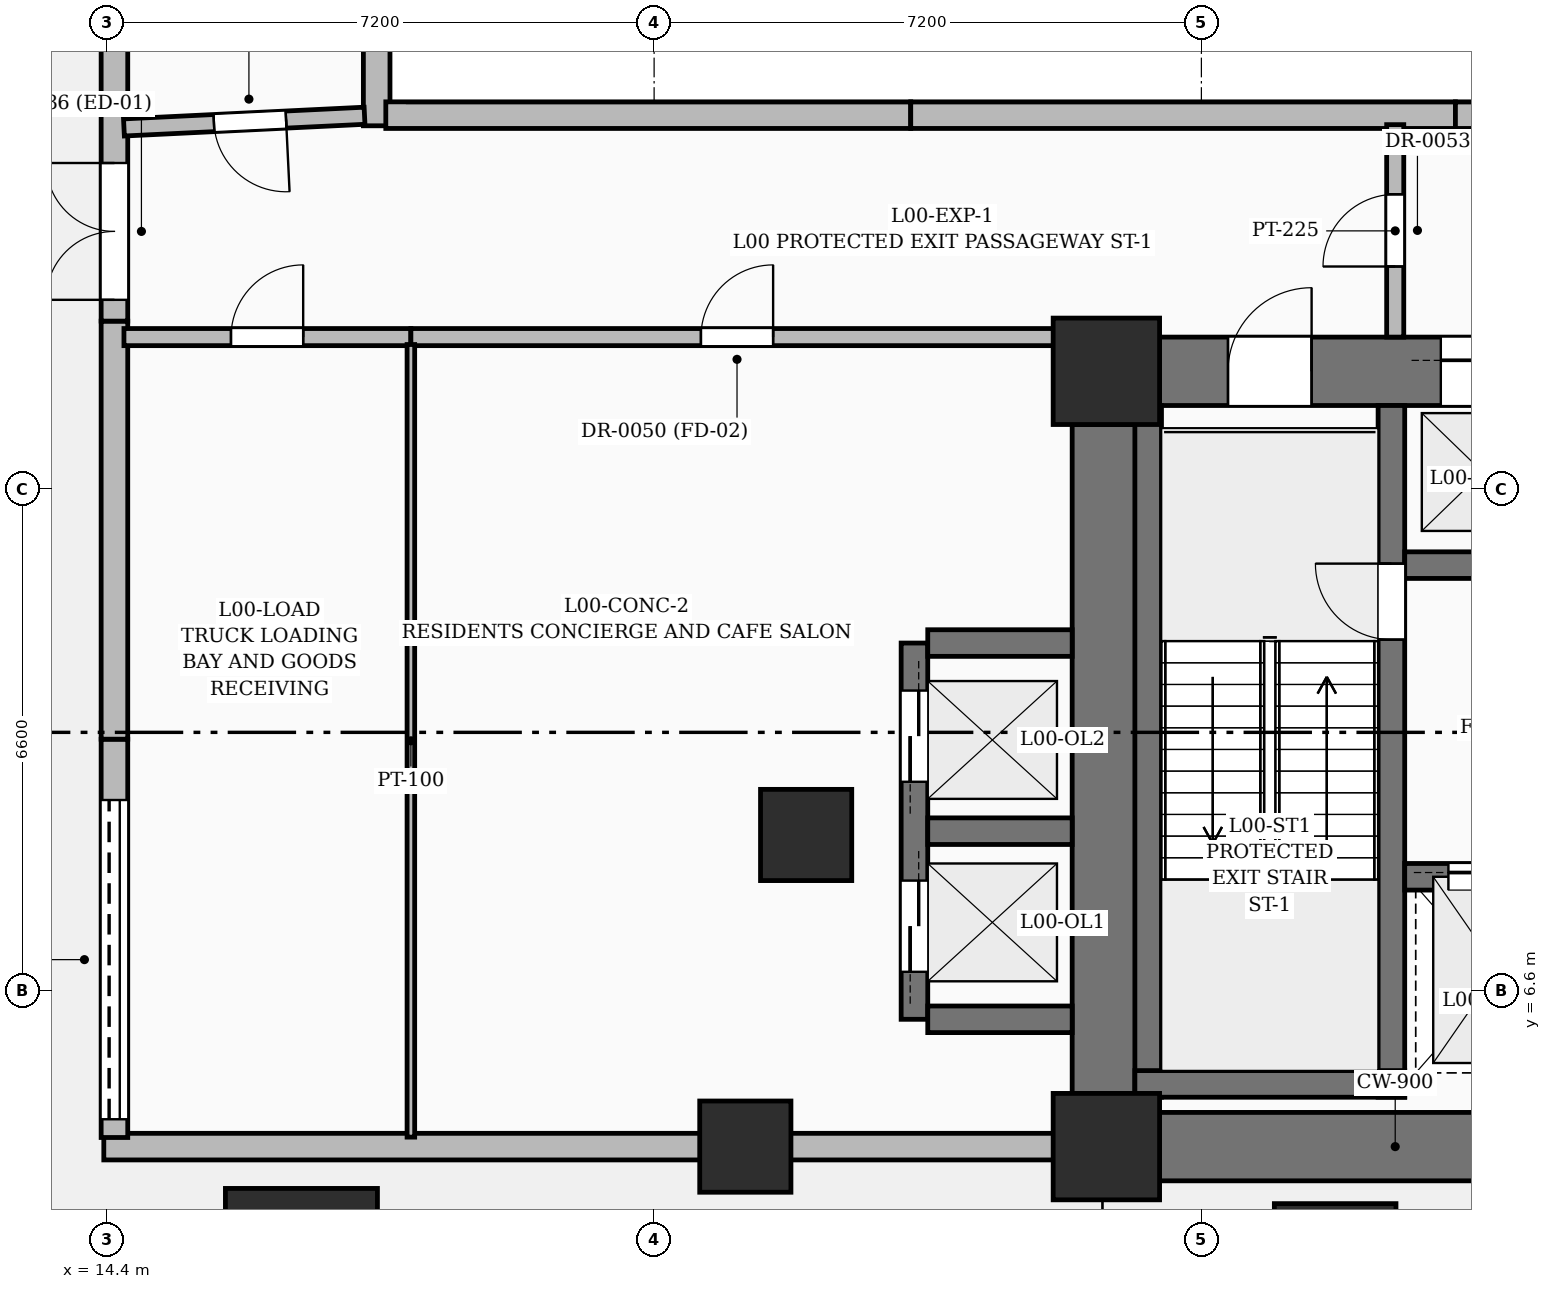
"""IFC4 building model, lengths in metres.
Left out: names, types, materials, properties, quantities, classifications, styles, units other than length and angle.
Written with IfcOpenShell. Run it as: python <this file> out.ifc"""

import sys

from ifc_helpers import new_model, si_unit, direction, frame, frame_2d, origin, origin_2d, place, context, subcontext, project, spatial, rectangle, circle, extrude, element, fill, save


model = new_model("IFC4")
c1 = context("Model", 3, precision=1e-05, world=origin(), true_north=direction((0.0, 1.0)))
c2 = subcontext(c1, "Body", "Model", "MODEL_VIEW")
j1 = project(units=[si_unit("LENGTHUNIT", "METRE"), si_unit("PLANEANGLEUNIT", "RADIAN")], contexts=[c1])
p1 = place(None, origin())
s1 = spatial("IfcSite", under=j1, at=p1, CompositionType="ELEMENT")
p2 = place(p1, origin())
s2 = spatial("IfcBuilding", under=s1, at=p2, CompositionType="ELEMENT")
p3 = place(p2, origin())
s3 = spatial("IfcBuildingStorey", under=s2, at=p3, CompositionType="ELEMENT", Elevation=0.0)
for number, where, z_axis, x_axis in (
    (1, (27.55, 4.55, 0.0), (0.0, 0.0, 1.0), (1.0, 0.0, 0.0)),
    (2, (27.55, 14.75, 0.0), (0.0, 0.0, 1.0), (1.0, 0.0, 0.0)),
):
    element("IfcColumn", number, at=place(p3, frame(where, z_axis=z_axis, x_axis=x_axis)), inside=s3, PredefinedType="COLUMN", context=c2, shape_type="SweptSolid", body=[
        extrude(rectangle(XDim=1.4, YDim=1.4, at=origin_2d()), origin(), (0.0, 0.0, 1.0), 8.4),
    ])
for number, where, z_axis, x_axis in (
    (3, (22.8, 4.55, 0.0), (0.0, 0.0, 1.0), (1.0, 0.0, 0.0)),
    (4, (23.6, 8.65, 0.0), (0.0, 0.0, 1.0), (1.0, 0.0, 0.0)),
):
    element("IfcColumn", number, at=place(p3, frame(where, z_axis=z_axis, x_axis=x_axis)), inside=s3, PredefinedType="COLUMN", context=c2, shape_type="SweptSolid", body=[
        extrude(rectangle(XDim=1.2, YDim=1.2, at=origin_2d()), origin(), (0.0, 0.0, 1.0), 8.4),
    ])
p4 = place(p3, frame((28.25, 4.55, 0.0), z_axis=(0.0, 0.0, 1.0), x_axis=(1.0, 0.0, 0.0)))
e5 = element("IfcWall", 5, at=p4, inside=s3, PredefinedType="SHEAR", context=c2, shape_type="SweptSolid", body=[
    extrude(rectangle(XDim=6.2, YDim=0.9, at=frame_2d((3.1, 0.0))), origin(), (0.0, 0.0, 1.0), 8.4),
])
p5 = place(p3, frame((28.25, 14.75, 0.0), z_axis=(0.0, 0.0, 1.0), x_axis=(1.0, 0.0, 0.0)))
e6 = element("IfcWall", 6, at=p5, inside=s3, PredefinedType="SHEAR", context=c2, shape_type="SweptSolid", body=[
    extrude(rectangle(XDim=6.2, YDim=0.9, at=frame_2d((3.1, 0.0))), origin(), (0.0, 0.0, 1.0), 8.4),
])
p6 = place(p5, frame((0.9, 0.0, 0.0)))
e7 = element("IfcOpeningElement", 7, at=p6, cuts=e6, PredefinedType="OPENING", context=c2, shape_type="SweptSolid", body=[
    extrude(rectangle(XDim=1.1, YDim=2.2, at=frame_2d((0.55, 1.1))), frame((0.0, 0.46, 0.0), z_axis=(0.0, -1.0, 0.0), x_axis=(1.0, 0.0, 0.0)), (0.0, 0.0, 1.0), 0.92),
])
p7 = place(p5, frame((3.7, 0.0, 0.0)))
e8 = element("IfcOpeningElement", 8, at=p7, cuts=e6, PredefinedType="OPENING", context=c2, shape_type="SweptSolid", body=[
    extrude(rectangle(XDim=1.1, YDim=2.2, at=frame_2d((0.55, 1.1))), frame((0.0, 0.46, 0.0), z_axis=(0.0, -1.0, 0.0), x_axis=(1.0, 0.0, 0.0)), (0.0, 0.0, 1.0), 0.92),
])
p8 = place(p3, frame((27.55, 5.25, 0.0), z_axis=(0.0, 0.0, 1.0), x_axis=(0.0, 1.0, 0.0)))
e9 = element("IfcWall", 9, at=p8, inside=s3, PredefinedType="SHEAR", context=c2, shape_type="SweptSolid", body=[
    extrude(rectangle(XDim=8.8, YDim=0.9, at=frame_2d((4.4, 0.0))), origin(), (0.0, 0.0, 1.0), 8.4),
])
p9 = place(p3, frame((28.1, 5.2, 0.0), z_axis=(0.0, 0.0, 1.0), x_axis=(0.0, 1.0, 0.0)))
e10 = element("IfcWall", 10, at=p9, inside=s3, PredefinedType="SOLIDWALL", context=c2, shape_type="SweptSolid", body=[
    extrude(rectangle(XDim=9.1, YDim=0.35, at=frame_2d((4.55, 0.0))), origin(), (0.0, 0.0, 1.0), 8.4),
])
p10 = place(p3, frame((31.3, 5.2, 0.0), z_axis=(0.0, 0.0, 1.0), x_axis=(0.0, 1.0, 0.0)))
e11 = element("IfcWall", 11, at=p10, inside=s3, PredefinedType="SOLIDWALL", context=c2, shape_type="SweptSolid", body=[
    extrude(rectangle(XDim=9.1, YDim=0.35, at=frame_2d((4.55, 0.0))), origin(), (0.0, 0.0, 1.0), 8.4),
])
p11 = place(p10, frame((6.02, 0.0, 0.0)))
e12 = element("IfcOpeningElement", 12, at=p11, cuts=e11, PredefinedType="OPENING", context=c2, shape_type="SweptSolid", body=[
    extrude(rectangle(XDim=1.0, YDim=2.15, at=frame_2d((0.5, 1.075))), frame((0.0, 0.185, 0.0), z_axis=(0.0, -1.0, 0.0), x_axis=(1.0, 0.0, 0.0)), (0.0, 0.0, 1.0), 0.37),
])
p12 = place(p3, frame((27.925, 5.375, 0.0), z_axis=(0.0, 0.0, 1.0), x_axis=(1.0, 0.0, 0.0)))
e13 = element("IfcWall", 13, at=p12, inside=s3, PredefinedType="SOLIDWALL", context=c2, shape_type="SweptSolid", body=[
    extrude(rectangle(XDim=3.55, YDim=0.35, at=frame_2d((1.775, 0.0))), origin(), (0.0, 0.0, 1.0), 8.4),
])
p13 = place(p3, frame((31.475, 8.1, 0.0), z_axis=(0.0, 0.0, 1.0), x_axis=(1.0, 0.0, 0.0)))
e14 = element("IfcWall", 14, at=p13, inside=s3, PredefinedType="SOLIDWALL", context=c2, shape_type="SweptSolid", body=[
    extrude(rectangle(XDim=4.05, YDim=0.35, at=frame_2d((2.025, 0.0))), origin(), (0.0, 0.0, 1.0), 8.4),
])
p14 = place(p13, frame((0.575, 0.0, 0.0)))
e15 = element("IfcOpeningElement", 15, at=p14, cuts=e14, PredefinedType="OPENING", context=c2, shape_type="SweptSolid", body=[
    extrude(rectangle(XDim=1.3, YDim=2.25, at=frame_2d((0.65, 1.125))), frame((0.0, 0.185, 0.0), z_axis=(0.0, -1.0, 0.0), x_axis=(1.0, 0.0, 0.0)), (0.0, 0.0, 1.0), 0.37),
])
p15 = place(p13, frame((2.675, 0.0, 0.0)))
e16 = element("IfcOpeningElement", 16, at=p15, cuts=e14, PredefinedType="OPENING", context=c2, shape_type="SweptSolid", body=[
    extrude(rectangle(XDim=1.1, YDim=2.2, at=frame_2d((0.55, 1.1))), frame((0.0, 0.185, 0.0), z_axis=(0.0, -1.0, 0.0), x_axis=(1.0, 0.0, 0.0)), (0.0, 0.0, 1.0), 0.37),
])
p16 = place(p3, frame((31.475, 12.2, 0.0), z_axis=(0.0, 0.0, 1.0), x_axis=(1.0, 0.0, 0.0)))
e17 = element("IfcWall", 17, at=p16, inside=s3, PredefinedType="SOLIDWALL", context=c2, shape_type="SweptSolid", body=[
    extrude(rectangle(XDim=4.05, YDim=0.35, at=frame_2d((2.025, 0.0))), origin(), (0.0, 0.0, 1.0), 8.4),
])
p17 = place(p16, frame((2.475, 0.0, 0.0)))
e18 = element("IfcOpeningElement", 18, at=p17, cuts=e17, PredefinedType="OPENING", context=c2, shape_type="SweptSolid", body=[
    extrude(rectangle(XDim=1.1, YDim=2.2, at=frame_2d((0.55, 1.1))), frame((0.0, 0.185, 0.0), z_axis=(0.0, -1.0, 0.0), x_axis=(1.0, 0.0, 0.0)), (0.0, 0.0, 1.0), 0.37),
])
p18 = place(p3, frame((25.025, 6.225, 0.0), z_axis=(0.0, 0.0, 1.0), x_axis=(0.0, 1.0, 0.0)))
e19 = element("IfcWall", 19, at=p18, inside=s3, PredefinedType="SOLIDWALL", context=c2, shape_type="SweptSolid", body=[
    extrude(rectangle(XDim=4.95, YDim=0.35, at=frame_2d((2.475, 0.0))), origin(), (0.0, 0.0, 1.0), 8.4),
])
p19 = place(p18, frame((0.625, 0.0, 0.0)))
e20 = element("IfcOpeningElement", 20, at=p19, cuts=e19, PredefinedType="OPENING", context=c2, shape_type="SweptSolid", body=[
    extrude(rectangle(XDim=1.2, YDim=2.2, at=frame_2d((0.6, 1.1))), frame((0.0, 0.185, 0.0), z_axis=(0.0, -1.0, 0.0), x_axis=(1.0, 0.0, 0.0)), (0.0, 0.0, 1.0), 0.37),
])
p20 = place(p18, frame((3.125, 0.0, 0.0)))
e21 = element("IfcOpeningElement", 21, at=p20, cuts=e19, PredefinedType="OPENING", context=c2, shape_type="SweptSolid", body=[
    extrude(rectangle(XDim=1.2, YDim=2.2, at=frame_2d((0.6, 1.1))), frame((0.0, 0.185, 0.0), z_axis=(0.0, -1.0, 0.0), x_axis=(1.0, 0.0, 0.0)), (0.0, 0.0, 1.0), 0.37),
])
for number, where, z_axis, x_axis in (
    (22, (25.2, 6.225, 0.0), (0.0, 0.0, 1.0), (1.0, 0.0, 0.0)),
    (23, (25.2, 8.7, 0.0), (0.0, 0.0, 1.0), (1.0, 0.0, 0.0)),
    (24, (25.2, 11.175, 0.0), (0.0, 0.0, 1.0), (1.0, 0.0, 0.0)),
):
    element("IfcWall", number, at=place(p3, frame(where, z_axis=z_axis, x_axis=x_axis)), inside=s3, PredefinedType="SOLIDWALL", context=c2, shape_type="SweptSolid", body=[
        extrude(rectangle(XDim=1.9, YDim=0.35, at=frame_2d((0.95, 0.0))), origin(), (0.0, 0.0, 1.0), 8.4),
    ])
p21 = place(p3, frame((16.96, 3.0, 0.0), z_axis=(0.0, 0.0, 1.0), x_axis=(1.0, 0.0, 0.0)))
e25 = element("IfcColumn", 25, at=p21, inside=s3, PredefinedType="COLUMN", context=c2, shape_type="SweptSolid", body=[
    extrude(circle(Radius=1.0, at=origin_2d()), origin(), (0.0, 0.0, 1.0), 8.4),
])
p22 = place(p3, frame((30.56, 3.0, 0.0), z_axis=(0.0, 0.0, 1.0), x_axis=(1.0, 0.0, 0.0)))
e26 = element("IfcColumn", 26, at=p22, inside=s3, PredefinedType="COLUMN", context=c2, shape_type="SweptSolid", body=[
    extrude(circle(Radius=0.8, at=origin_2d()), origin(), (0.0, 0.0, 1.0), 8.4),
])
p23 = place(p3, frame((17.95, 22.446, 0.0), z_axis=(0.0, 0.0, 1.0), x_axis=(0.0, -1.0, 0.0)))
e27 = element("IfcWall", 27, at=p23, inside=s3, PredefinedType="SOLIDWALL", context=c2, shape_type="SweptSolid", body=[
    extrude(rectangle(XDim=4.466, YDim=0.35, at=frame_2d((2.233, 0.0))), origin(), (0.0, 0.0, 1.0), 5.875),
])
p24 = place(p3, frame((18.07, 18.12, 0.0), z_axis=(0.0, 0.0, 1.0), x_axis=(1.0, 0.0, 0.0)))
e28 = element("IfcWall", 28, at=p24, inside=s3, PredefinedType="SOLIDWALL", context=c2, shape_type="SweptSolid", body=[
    extrude(rectangle(XDim=6.906, YDim=0.35, at=frame_2d((3.453, 0.0))), origin(), (0.0, 0.0, 1.0), 5.875),
])
p25 = place(p3, frame((24.976, 18.12, 0.0), z_axis=(0.0, 0.0, 1.0), x_axis=(1.0, 0.0, 0.0)))
e29 = element("IfcWall", 29, at=p25, inside=s3, PredefinedType="SOLIDWALL", context=c2, shape_type="SweptSolid", body=[
    extrude(rectangle(XDim=7.166, YDim=0.35, at=frame_2d((3.583, 0.0))), origin(), (0.0, 0.0, 1.0), 7.467),
])
p26 = place(p3, frame((32.142, 18.12, 0.0), z_axis=(0.0, 0.0, 1.0), x_axis=(1.0, 0.0, 0.0)))
e30 = element("IfcWall", 30, at=p26, inside=s3, PredefinedType="SOLIDWALL", context=c2, shape_type="SweptSolid", body=[
    extrude(rectangle(XDim=7.166, YDim=0.35, at=frame_2d((3.583, 0.0))), origin(), (0.0, 0.0, 1.0), 7.064),
])
p27 = place(p3, frame((26.888, 4.55, 0.0), z_axis=(0.0, 0.0, 1.0), x_axis=(-1.0, 0.0, 0.0)))
e31 = element("IfcWall", 31, at=p27, inside=s3, PredefinedType="SOLIDWALL", context=c2, shape_type="SweptSolid", body=[
    extrude(rectangle(XDim=3.526, YDim=0.35, at=frame_2d((1.763, 0.0))), origin(), (0.0, 0.0, 1.0), 7.064),
])
p28 = place(p3, frame((22.238, 4.55, 0.0), z_axis=(0.0, 0.0, 1.0), x_axis=(-1.0, 0.0, 0.0)))
e32 = element("IfcWall", 32, at=p28, inside=s3, PredefinedType="SOLIDWALL", context=c2, shape_type="SweptSolid", body=[
    extrude(rectangle(XDim=7.878, YDim=0.35, at=frame_2d((3.939, 0.0))), origin(), (0.0, 0.0, 1.0), 5.875),
])
p29 = place(p3, frame((14.5, 4.67, 0.0), z_axis=(0.0, 0.0, 1.0), x_axis=(0.0, 1.0, 0.0)))
e33 = element("IfcWall", 33, at=p29, inside=s3, PredefinedType="SOLIDWALL", context=c2, shape_type="SweptSolid", body=[
    extrude(rectangle(XDim=5.24, YDim=0.35, at=frame_2d((2.62, 0.0))), origin(), (0.0, 0.0, 1.0), 6.875),
])
p30 = place(p29, frame((0.24, 0.0, 0.0)))
e34 = element("IfcOpeningElement", 34, at=p30, cuts=e33, PredefinedType="OPENING", context=c2, shape_type="SweptSolid", body=[
    extrude(rectangle(XDim=4.2, YDim=3.6, at=frame_2d((2.1, 1.8))), frame((0.0, 0.185, 0.0), z_axis=(0.0, -1.0, 0.0), x_axis=(1.0, 0.0, 0.0)), (0.0, 0.0, 1.0), 0.37),
])
p31 = place(p3, frame((14.5, 9.91, 0.0), z_axis=(0.0, 0.0, 1.0), x_axis=(0.0, 1.0, 0.0)))
e35 = element("IfcWall", 35, at=p31, inside=s3, PredefinedType="SOLIDWALL", context=c2, shape_type="SweptSolid", body=[
    extrude(rectangle(XDim=5.5, YDim=0.35, at=frame_2d((2.75, 0.0))), origin(), (0.0, 0.0, 1.0), 5.875),
])
p32 = place(p3, frame((14.5, 15.41, 0.0), z_axis=(0.0, 0.0, 1.0), x_axis=(0.0, 1.0, 0.0)))
e36 = element("IfcWall", 36, at=p32, inside=s3, PredefinedType="SOLIDWALL", context=c2, shape_type="SweptSolid", body=[
    extrude(rectangle(XDim=5.5, YDim=0.35, at=frame_2d((2.75, 0.0))), origin(), (0.0, 0.0, 1.0), 6.875),
])
p33 = place(p32, frame((0.28, 0.0, 0.0)))
e37 = element("IfcOpeningElement", 37, at=p33, cuts=e36, PredefinedType="OPENING", context=c2, shape_type="SweptSolid", body=[
    extrude(rectangle(XDim=1.8, YDim=2.2, at=frame_2d((0.9, 1.1))), frame((0.0, 0.185, 0.0), z_axis=(0.0, -1.0, 0.0), x_axis=(1.0, 0.0, 0.0)), (0.0, 0.0, 1.0), 0.37),
])
p34 = place(p3, frame((31.35, 15.2, 0.0), z_axis=(0.0, 0.0, 1.0), x_axis=(0.0, 1.0, 0.0)))
e38 = element("IfcWall", 38, at=p34, inside=s3, PredefinedType="PARTITIONING", context=c2, shape_type="SweptSolid", body=[
    extrude(rectangle(XDim=2.795, YDim=0.225, at=frame_2d((1.397, 0.0))), origin(), (0.0, 0.0, 1.0), 8.1),
])
p35 = place(p34, frame((0.929, 0.0, 0.0)))
e39 = element("IfcOpeningElement", 39, at=p35, cuts=e38, PredefinedType="OPENING", context=c2, shape_type="SweptSolid", body=[
    extrude(rectangle(XDim=0.95, YDim=2.15, at=frame_2d((0.475, 1.075))), frame((0.0, 0.123, 0.0), z_axis=(0.0, -1.0, 0.0), x_axis=(1.0, 0.0, 0.0)), (0.0, 0.0, 1.0), 0.245),
])
p36 = place(p3, frame((17.79, 18.112, 0.0), z_axis=(0.0, 0.0, 1.0), x_axis=(-0.998817740056, -0.048611954799, 0.0)))
e40 = element("IfcWall", 40, at=p36, inside=s3, PredefinedType="PARTITIONING", context=c2, shape_type="SweptSolid", body=[
    extrude(rectangle(XDim=3.169, YDim=0.225, at=frame_2d((1.584, 0.0))), origin(), (0.0, 0.0, 1.0), 6.87),
])
p37 = place(p36, frame((1.034, 0.0, 0.0)))
e41 = element("IfcOpeningElement", 41, at=p37, cuts=e40, PredefinedType="OPENING", context=c2, shape_type="SweptSolid", body=[
    extrude(rectangle(XDim=0.95, YDim=2.15, at=frame_2d((0.475, 1.075))), frame((0.0, 0.123, 0.0), z_axis=(0.0, -1.0, 0.0), x_axis=(1.0, 0.0, 0.0)), (0.0, 0.0, 1.0), 0.245),
])
p38 = place(p3, frame((14.625, 15.2, 0.0), z_axis=(0.0, 0.0, 1.0), x_axis=(1.0, 0.0, 0.0)))
e42 = element("IfcWall", 42, at=p38, inside=s3, PredefinedType="PARTITIONING", context=c2, shape_type="SweptSolid", body=[
    extrude(rectangle(XDim=3.775, YDim=0.225, at=frame_2d((1.887, 0.0))), origin(), (0.0, 0.0, 1.0), 7.462),
])
p39 = place(p38, frame((1.408, 0.0, 0.0)))
e43 = element("IfcOpeningElement", 43, at=p39, cuts=e42, PredefinedType="OPENING", context=c2, shape_type="SweptSolid", body=[
    extrude(rectangle(XDim=0.95, YDim=2.15, at=frame_2d((0.475, 1.075))), frame((0.0, 0.123, 0.0), z_axis=(0.0, -1.0, 0.0), x_axis=(1.0, 0.0, 0.0)), (0.0, 0.0, 1.0), 0.245),
])
p40 = place(p3, frame((18.4, 15.2, 0.0), z_axis=(0.0, 0.0, 1.0), x_axis=(1.0, 0.0, 0.0)))
e44 = element("IfcWall", 44, at=p40, inside=s3, PredefinedType="PARTITIONING", context=c2, shape_type="SweptSolid", body=[
    extrude(rectangle(XDim=8.7, YDim=0.225, at=frame_2d((4.35, 0.0))), origin(), (0.0, 0.0, 1.0), 5.87),
])
p41 = place(p40, frame((3.816, 0.0, 0.0)))
e45 = element("IfcOpeningElement", 45, at=p41, cuts=e44, PredefinedType="OPENING", context=c2, shape_type="SweptSolid", body=[
    extrude(rectangle(XDim=0.95, YDim=2.15, at=frame_2d((0.475, 1.075))), frame((0.0, 0.123, 0.0), z_axis=(0.0, -1.0, 0.0), x_axis=(1.0, 0.0, 0.0)), (0.0, 0.0, 1.0), 0.245),
])
p42 = place(p3, frame((18.4, 4.675, 0.0), z_axis=(0.0, 0.0, 1.0), x_axis=(0.0, 1.0, 0.0)))
e46 = element("IfcWall", 46, at=p42, inside=s3, PredefinedType="PARTITIONING", context=c2, shape_type="SweptSolid", body=[
    extrude(rectangle(XDim=10.427, YDim=0.1, at=frame_2d((5.214, 0.0))), origin(), (0.0, 0.0, 1.0), 5.87),
])
p43 = place(p30, origin())
e47 = element("IfcDoor", 47, at=p43, inside=s3, OperationType="ROLLINGUP", PredefinedType="GATE", context=c2, shape_type="SweptSolid", body=[
    extrude(rectangle(XDim=4.2, YDim=3.6, at=frame_2d((2.1, 1.8))), frame((0.0, 0.025, 0.0), z_axis=(0.0, -1.0, 0.0), x_axis=(1.0, 0.0, 0.0)), (0.0, 0.0, 1.0), 0.05),
])
fill(e34, e47)
p44 = place(p33, origin())
e48 = element("IfcDoor", 48, at=p44, inside=s3, OperationType="DOUBLE_DOOR_SINGLE_SWING", PredefinedType="DOOR", context=c2, shape_type="SweptSolid", body=[
    extrude(rectangle(XDim=1.8, YDim=2.2, at=frame_2d((0.9, 1.1))), frame((0.0, 0.025, 0.0), z_axis=(0.0, -1.0, 0.0), x_axis=(1.0, 0.0, 0.0)), (0.0, 0.0, 1.0), 0.05),
])
fill(e37, e48)
p45 = place(p6, origin())
e49 = element("IfcDoor", 49, at=p45, inside=s3, OperationType="SINGLE_SWING_RIGHT", PredefinedType="DOOR", context=c2, shape_type="SweptSolid", body=[
    extrude(rectangle(XDim=1.1, YDim=2.2, at=frame_2d((0.55, 1.1))), frame((0.0, 0.025, 0.0), z_axis=(0.0, -1.0, 0.0), x_axis=(1.0, 0.0, 0.0)), (0.0, 0.0, 1.0), 0.05),
])
fill(e7, e49)
p46 = place(p11, origin())
e50 = element("IfcDoor", 50, at=p46, inside=s3, OperationType="SINGLE_SWING_RIGHT", PredefinedType="DOOR", context=c2, shape_type="SweptSolid", body=[
    extrude(rectangle(XDim=1.0, YDim=2.15, at=frame_2d((0.5, 1.075))), frame((0.0, 0.025, 0.0), z_axis=(0.0, -1.0, 0.0), x_axis=(1.0, 0.0, 0.0)), (0.0, 0.0, 1.0), 0.05),
])
fill(e12, e50)
p47 = place(p14, origin())
e51 = element("IfcDoor", 51, at=p47, inside=s3, OperationType="DOUBLE_DOOR_SLIDING", PredefinedType="DOOR", context=c2, shape_type="SweptSolid", body=[
    extrude(rectangle(XDim=1.3, YDim=2.25, at=frame_2d((0.65, 1.125))), frame((0.0, 0.025, 0.0), z_axis=(0.0, -1.0, 0.0), x_axis=(1.0, 0.0, 0.0)), (0.0, 0.0, 1.0), 0.05),
])
fill(e15, e51)
p48 = place(p7, origin())
e52 = element("IfcDoor", 52, at=p48, inside=s3, OperationType="DOUBLE_DOOR_SLIDING", PredefinedType="DOOR", context=c2, shape_type="SweptSolid", body=[
    extrude(rectangle(XDim=1.1, YDim=2.2, at=frame_2d((0.55, 1.1))), frame((0.0, 0.025, 0.0), z_axis=(0.0, -1.0, 0.0), x_axis=(1.0, 0.0, 0.0)), (0.0, 0.0, 1.0), 0.05),
])
fill(e8, e52)
p49 = place(p19, origin())
e53 = element("IfcDoor", 53, at=p49, inside=s3, OperationType="DOUBLE_DOOR_SLIDING", PredefinedType="DOOR", context=c2, shape_type="SweptSolid", body=[
    extrude(rectangle(XDim=1.2, YDim=2.2, at=frame_2d((0.6, 1.1))), frame((0.0, 0.025, 0.0), z_axis=(0.0, -1.0, 0.0), x_axis=(1.0, 0.0, 0.0)), (0.0, 0.0, 1.0), 0.05),
])
fill(e20, e53)
p50 = place(p20, origin())
e54 = element("IfcDoor", 54, at=p50, inside=s3, OperationType="DOUBLE_DOOR_SLIDING", PredefinedType="DOOR", context=c2, shape_type="SweptSolid", body=[
    extrude(rectangle(XDim=1.2, YDim=2.2, at=frame_2d((0.6, 1.1))), frame((0.0, 0.025, 0.0), z_axis=(0.0, -1.0, 0.0), x_axis=(1.0, 0.0, 0.0)), (0.0, 0.0, 1.0), 0.05),
])
fill(e21, e54)
p51 = place(p41, origin())
e55 = element("IfcDoor", 55, at=p51, inside=s3, OperationType="SINGLE_SWING_RIGHT", PredefinedType="DOOR", context=c2, shape_type="SweptSolid", body=[
    extrude(rectangle(XDim=0.95, YDim=2.15, at=frame_2d((0.475, 1.075))), frame((0.0, 0.025, 0.0), z_axis=(0.0, -1.0, 0.0), x_axis=(1.0, 0.0, 0.0)), (0.0, 0.0, 1.0), 0.05),
])
fill(e45, e55)
p52 = place(p37, origin())
e56 = element("IfcDoor", 56, at=p52, inside=s3, OperationType="SINGLE_SWING_LEFT", PredefinedType="DOOR", context=c2, shape_type="SweptSolid", body=[
    extrude(rectangle(XDim=0.95, YDim=2.15, at=frame_2d((0.475, 1.075))), frame((0.0, 0.025, 0.0), z_axis=(0.0, -1.0, 0.0), x_axis=(1.0, 0.0, 0.0)), (0.0, 0.0, 1.0), 0.05),
])
fill(e41, e56)
p53 = place(p35, origin())
e57 = element("IfcDoor", 57, at=p53, inside=s3, OperationType="SINGLE_SWING_LEFT", PredefinedType="DOOR", context=c2, shape_type="SweptSolid", body=[
    extrude(rectangle(XDim=0.95, YDim=2.15, at=frame_2d((0.475, 1.075))), frame((0.0, 0.025, 0.0), z_axis=(0.0, -1.0, 0.0), x_axis=(1.0, 0.0, 0.0)), (0.0, 0.0, 1.0), 0.05),
])
fill(e39, e57)
p54 = place(p39, origin())
e58 = element("IfcDoor", 58, at=p54, inside=s3, OperationType="SINGLE_SWING_RIGHT", PredefinedType="DOOR", context=c2, shape_type="SweptSolid", body=[
    extrude(rectangle(XDim=0.95, YDim=2.15, at=frame_2d((0.475, 1.075))), frame((0.0, 0.025, 0.0), z_axis=(0.0, -1.0, 0.0), x_axis=(1.0, 0.0, 0.0)), (0.0, 0.0, 1.0), 0.05),
])
fill(e43, e58)
save(model, sys.argv[1])
